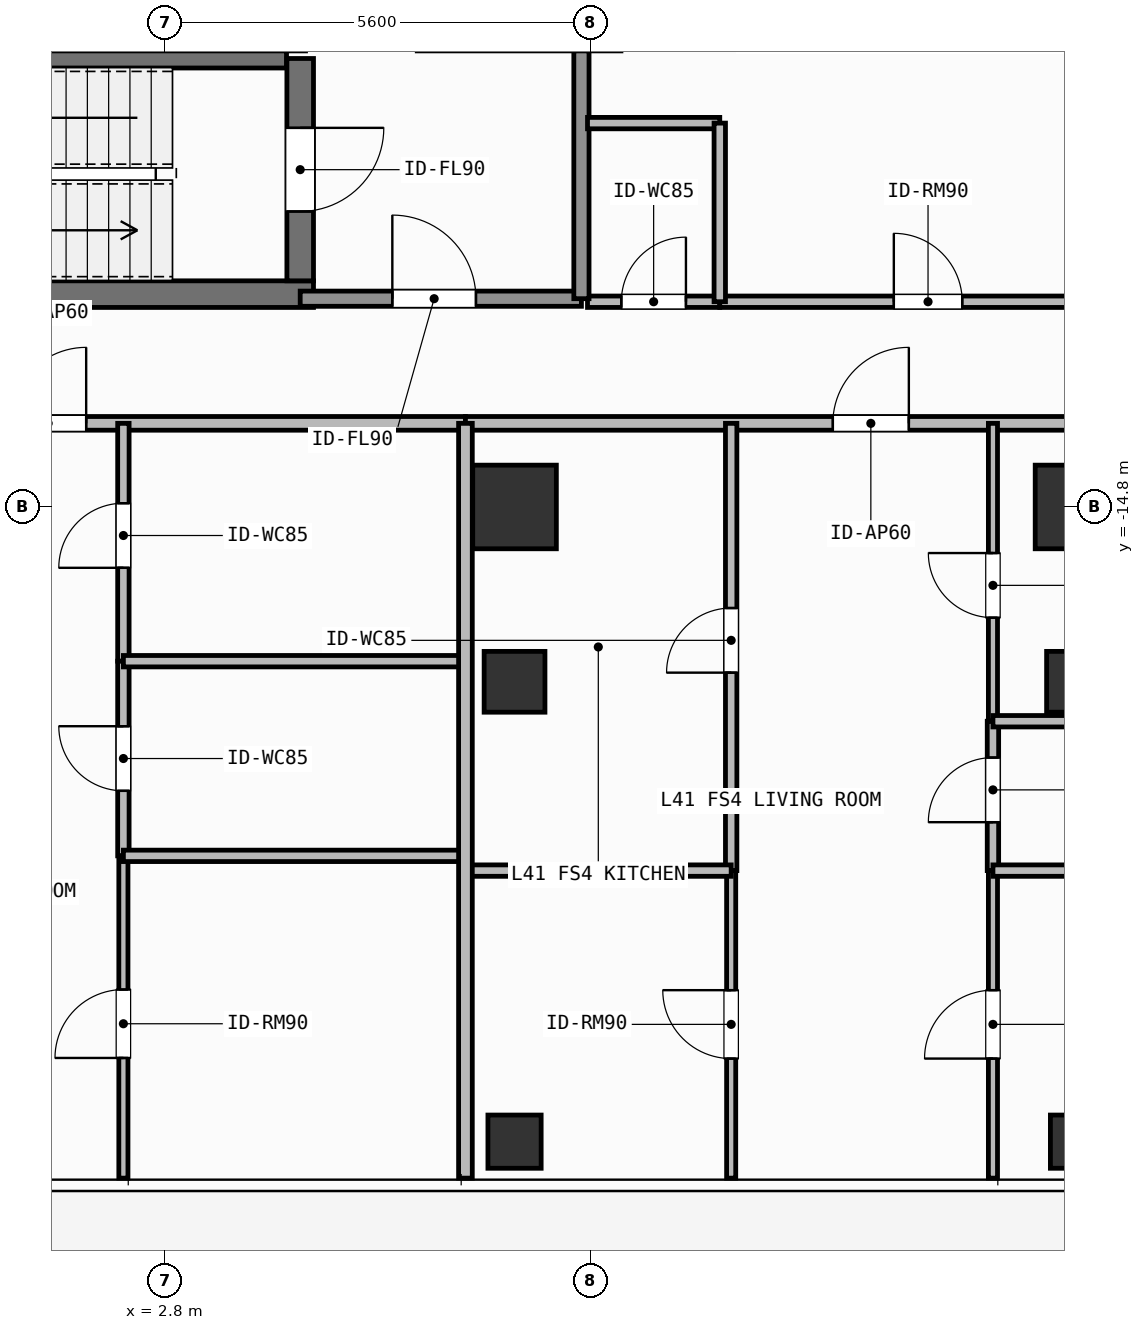
"""IFC4 building model, lengths in metres.
Left out: names, types, materials, properties, quantities, classifications, styles, units other than length and angle.
Written with IfcOpenShell. Run it as: python <this file> out.ifc"""

import sys

from ifc_helpers import new_model, si_unit, direction, frame, frame_2d, origin, origin_2d, place, context, subcontext, project, spatial, rectangle, hollow_rectangle, extrude, element, fill, save


model = new_model("IFC4")
c1 = context("Model", 3, precision=1e-05, world=origin(), true_north=direction((0.0, 1.0)))
c2 = subcontext(c1, "Body", "Model", "MODEL_VIEW")
j1 = project(units=[si_unit("LENGTHUNIT", "METRE"), si_unit("PLANEANGLEUNIT", "RADIAN")], contexts=[c1])
p1 = place(None, origin())
s1 = spatial("IfcSite", under=j1, at=p1, CompositionType="ELEMENT")
p2 = place(p1, origin())
s2 = spatial("IfcBuilding", under=s1, at=p2, CompositionType="ELEMENT")
p3 = place(p2, frame((0.0, 0.0, 168.0)))
s3 = spatial("IfcBuildingStorey", under=s2, at=p3, CompositionType="ELEMENT", Elevation=168.0)
p4 = place(p3, frame((-2.555, -12.0, 0.0), z_axis=(0.0, 0.0, 1.0), x_axis=(1.0, 0.0, 0.0)))
e1 = element("IfcWall", 1, at=p4, inside=s3, PredefinedType="SHEAR", context=c2, shape_type="SweptSolid", body=[
    extrude(rectangle(XDim=7.31, YDim=0.35, at=frame_2d((3.655, 0.0))), origin(), (0.0, 0.0, 1.0), 3.9),
])
p5 = place(p3, frame((-2.2, -8.913, 0.0), z_axis=(0.0, 0.0, 1.0), x_axis=(1.0, 0.0, 0.0)))
e2 = element("IfcWall", 2, at=p5, inside=s3, PredefinedType="SHEAR", context=c2, shape_type="SweptSolid", body=[
    extrude(rectangle(XDim=6.6, YDim=0.225, at=frame_2d((3.3, 0.0))), origin(), (0.0, 0.0, 1.0), 3.9),
])
p6 = place(p3, frame((4.58, -8.9, 0.0), z_axis=(0.0, 0.0, 1.0), x_axis=(0.0, -1.0, 0.0)))
e3 = element("IfcWall", 3, at=p6, inside=s3, PredefinedType="SHEAR", context=c2, shape_type="SweptSolid", body=[
    extrude(rectangle(XDim=2.925, YDim=0.35, at=frame_2d((1.462, 0.0))), origin(), (0.0, 0.0, 1.0), 3.9),
])
p7 = place(p6, frame((0.913, 0.0, 0.0)))
e4 = element("IfcOpeningElement", 4, at=p7, cuts=e3, PredefinedType="OPENING", context=c2, shape_type="SweptSolid", body=[
    extrude(rectangle(XDim=1.1, YDim=2.15, at=frame_2d((0.55, 1.075))), frame((0.0, 0.185, 0.0), z_axis=(0.0, -1.0, 0.0), x_axis=(1.0, 0.0, 0.0)), (0.0, 0.0, 1.0), 0.37),
])
for number, where, z_axis, x_axis in (
    (5, (7.4, -14.8, 0.0), (0.0, 0.0, 1.0), (1.0, 0.0, 0.0)),
    (6, (14.8, -14.8, 0.0), (0.0, 0.0, 1.0), (1.0, 0.0, 0.0)),
):
    element("IfcColumn", number, at=place(p3, frame(where, z_axis=z_axis, x_axis=x_axis)), inside=s3, PredefinedType="COLUMN", context=c2, shape_type="SweptSolid", body=[
        extrude(rectangle(XDim=1.1, YDim=1.1, at=origin_2d()), origin(), (0.0, 0.0, 1.0), 3.9),
    ])
for number, where, z_axis, x_axis in (
    (7, (7.4, -17.1, 0.0), (0.0, 0.0, 1.0), (1.0, 0.0, 0.0)),
    (8, (14.8, -17.1, 0.0), (0.0, 0.0, 1.0), (1.0, 0.0, 0.0)),
):
    element("IfcColumn", number, at=place(p3, frame(where, z_axis=z_axis, x_axis=x_axis)), inside=s3, PredefinedType="COLUMN", context=c2, shape_type="SweptSolid", body=[
        extrude(hollow_rectangle(XDim=0.8, YDim=0.8, WallThickness=0.036, at=origin_2d()), origin(), (0.0, 0.0, 1.0), 3.9),
    ])
for number, where, z_axis, x_axis in (
    (9, (7.4, -23.15, 0.0), (0.0, 0.0, 1.0), (1.0, 0.0, 0.0)),
    (10, (14.8, -23.15, 0.0), (0.0, 0.0, 1.0), (1.0, 0.0, 0.0)),
):
    element("IfcColumn", number, at=place(p3, frame(where, z_axis=z_axis, x_axis=x_axis)), inside=s3, PredefinedType="COLUMN", context=c2, shape_type="SweptSolid", body=[
        extrude(hollow_rectangle(XDim=0.7, YDim=0.7, WallThickness=0.032, at=origin_2d()), origin(), (0.0, 0.0, 1.0), 3.9),
    ])
p8 = place(p3, frame((4.58, -12.06, 0.0), z_axis=(0.0, 0.0, 1.0), x_axis=(1.0, 0.0, 0.0)))
e11 = element("IfcWall", 11, at=p8, inside=s3, PredefinedType="SOLIDWALL", context=c2, shape_type="SweptSolid", body=[
    extrude(rectangle(XDim=3.7, YDim=0.2, at=frame_2d((1.85, 0.0))), origin(), (0.0, 0.0, 1.0), 3.68),
])
p9 = place(p8, frame((1.212, 0.0, 0.0)))
e12 = element("IfcOpeningElement", 12, at=p9, cuts=e11, PredefinedType="OPENING", context=c2, shape_type="SweptSolid", body=[
    extrude(rectangle(XDim=1.1, YDim=2.15, at=frame_2d((0.55, 1.075))), frame((0.0, 0.11, 0.0), z_axis=(0.0, -1.0, 0.0), x_axis=(1.0, 0.0, 0.0)), (0.0, 0.0, 1.0), 0.22),
])
p10 = place(p3, frame((8.36, -12.1, 0.0), z_axis=(0.0, 0.0, 1.0), x_axis=(1.0, 0.0, 0.0)))
e13 = element("IfcWall", 13, at=p10, inside=s3, PredefinedType="PARTITIONING", context=c2, shape_type="SweptSolid", body=[
    extrude(rectangle(XDim=1.74, YDim=0.15, at=frame_2d((0.87, 0.0))), origin(), (0.0, 0.0, 1.0), 3.68),
])
p11 = place(p10, frame((0.445, 0.0, 0.0)))
e14 = element("IfcOpeningElement", 14, at=p11, cuts=e13, PredefinedType="OPENING", context=c2, shape_type="SweptSolid", body=[
    extrude(rectangle(XDim=0.85, YDim=2.1, at=frame_2d((0.425, 1.05))), frame((0.0, 0.085, 0.0), z_axis=(0.0, -1.0, 0.0), x_axis=(1.0, 0.0, 0.0)), (0.0, 0.0, 1.0), 0.17),
])
p12 = place(p3, frame((10.1, -12.1, 0.0), z_axis=(0.0, 0.0, 1.0), x_axis=(1.0, 0.0, 0.0)))
e15 = element("IfcWall", 15, at=p12, inside=s3, PredefinedType="PARTITIONING", context=c2, shape_type="SweptSolid", body=[
    extrude(rectangle(XDim=5.48, YDim=0.15, at=frame_2d((2.74, 0.0))), origin(), (0.0, 0.0, 1.0), 3.68),
])
p13 = place(p12, frame((2.29, 0.0, 0.0)))
e16 = element("IfcOpeningElement", 16, at=p13, cuts=e15, PredefinedType="OPENING", context=c2, shape_type="SweptSolid", body=[
    extrude(rectangle(XDim=0.9, YDim=2.1, at=frame_2d((0.45, 1.05))), frame((0.0, 0.085, 0.0), z_axis=(0.0, -1.0, 0.0), x_axis=(1.0, 0.0, 0.0)), (0.0, 0.0, 1.0), 0.17),
])
p14 = place(p3, frame((-1.9, -13.7, 0.0), z_axis=(0.0, 0.0, 1.0), x_axis=(1.0, 0.0, 0.0)))
e17 = element("IfcWall", 17, at=p14, inside=s3, PredefinedType="PARTITIONING", context=c2, shape_type="SweptSolid", body=[
    extrude(rectangle(XDim=8.654, YDim=0.18, at=frame_2d((4.327, 0.0))), origin(), (0.0, 0.0, 1.0), 3.68),
])
p15 = place(p14, frame((2.664, 0.0, 0.0)))
e18 = element("IfcOpeningElement", 18, at=p15, cuts=e17, PredefinedType="OPENING", context=c2, shape_type="SweptSolid", body=[
    extrude(rectangle(XDim=1.0, YDim=2.2, at=frame_2d((0.5, 1.1))), frame((0.0, 0.1, 0.0), z_axis=(0.0, -1.0, 0.0), x_axis=(1.0, 0.0, 0.0)), (0.0, 0.0, 1.0), 0.2),
])
p16 = place(p3, frame((2.254, -16.829, 0.0), z_axis=(0.0, 0.0, 1.0), x_axis=(0.0, 1.0, 0.0)))
e19 = element("IfcWall", 19, at=p16, inside=s3, PredefinedType="PARTITIONING", context=c2, shape_type="SweptSolid", body=[
    extrude(rectangle(XDim=3.129, YDim=0.15, at=frame_2d((1.564, 0.0))), origin(), (0.0, 0.0, 1.0), 3.68),
])
p17 = place(p16, frame((1.229, 0.0, 0.0)))
e20 = element("IfcOpeningElement", 20, at=p17, cuts=e19, PredefinedType="OPENING", context=c2, shape_type="SweptSolid", body=[
    extrude(rectangle(XDim=0.85, YDim=2.1, at=frame_2d((0.425, 1.05))), frame((0.0, 0.085, 0.0), z_axis=(0.0, -1.0, 0.0), x_axis=(1.0, 0.0, 0.0)), (0.0, 0.0, 1.0), 0.17),
])
p18 = place(p3, frame((2.254, -19.39, 0.0), z_axis=(0.0, 0.0, 1.0), x_axis=(0.0, 1.0, 0.0)))
e21 = element("IfcWall", 21, at=p18, inside=s3, PredefinedType="PARTITIONING", context=c2, shape_type="SweptSolid", body=[
    extrude(rectangle(XDim=2.561, YDim=0.15, at=frame_2d((1.28, 0.0))), origin(), (0.0, 0.0, 1.0), 3.68),
])
p19 = place(p18, frame((0.855, 0.0, 0.0)))
e22 = element("IfcOpeningElement", 22, at=p19, cuts=e21, PredefinedType="OPENING", context=c2, shape_type="SweptSolid", body=[
    extrude(rectangle(XDim=0.85, YDim=2.1, at=frame_2d((0.425, 1.05))), frame((0.0, 0.085, 0.0), z_axis=(0.0, -1.0, 0.0), x_axis=(1.0, 0.0, 0.0)), (0.0, 0.0, 1.0), 0.17),
])
p20 = place(p3, frame((2.254, -23.63, 0.0), z_axis=(0.0, 0.0, 1.0), x_axis=(0.0, 1.0, 0.0)))
e23 = element("IfcWall", 23, at=p20, inside=s3, PredefinedType="PARTITIONING", context=c2, shape_type="SweptSolid", body=[
    extrude(rectangle(XDim=4.24, YDim=0.12, at=frame_2d((2.12, 0.0))), origin(), (0.0, 0.0, 1.0), 3.68),
])
p21 = place(p20, frame((1.581, 0.0, 0.0)))
e24 = element("IfcOpeningElement", 24, at=p21, cuts=e23, PredefinedType="OPENING", context=c2, shape_type="SweptSolid", body=[
    extrude(rectangle(XDim=0.9, YDim=2.1, at=frame_2d((0.45, 1.05))), frame((0.0, 0.07, 0.0), z_axis=(0.0, -1.0, 0.0), x_axis=(1.0, 0.0, 0.0)), (0.0, 0.0, 1.0), 0.14),
])
p22 = place(p3, frame((6.754, -13.7, 0.0), z_axis=(0.0, 0.0, 1.0), x_axis=(1.0, 0.0, 0.0)))
e25 = element("IfcWall", 25, at=p22, inside=s3, PredefinedType="PARTITIONING", context=c2, shape_type="SweptSolid", body=[
    extrude(rectangle(XDim=11.566, YDim=0.18, at=frame_2d((5.783, 0.0))), origin(), (0.0, 0.0, 1.0), 3.68),
])
p23 = place(p22, frame((4.833, 0.0, 0.0)))
e26 = element("IfcOpeningElement", 26, at=p23, cuts=e25, PredefinedType="OPENING", context=c2, shape_type="SweptSolid", body=[
    extrude(rectangle(XDim=1.0, YDim=2.2, at=frame_2d((0.5, 1.1))), frame((0.0, 0.1, 0.0), z_axis=(0.0, -1.0, 0.0), x_axis=(1.0, 0.0, 0.0)), (0.0, 0.0, 1.0), 0.2),
])
p24 = place(p3, frame((10.25, -19.584, 0.0), z_axis=(0.0, 0.0, 1.0), x_axis=(0.0, 1.0, 0.0)))
e27 = element("IfcWall", 27, at=p24, inside=s3, PredefinedType="PARTITIONING", context=c2, shape_type="SweptSolid", body=[
    extrude(rectangle(XDim=5.884, YDim=0.15, at=frame_2d((2.942, 0.0))), origin(), (0.0, 0.0, 1.0), 3.68),
])
p25 = place(p24, frame((2.604, 0.0, 0.0)))
e28 = element("IfcOpeningElement", 28, at=p25, cuts=e27, PredefinedType="OPENING", context=c2, shape_type="SweptSolid", body=[
    extrude(rectangle(XDim=0.85, YDim=2.1, at=frame_2d((0.425, 1.05))), frame((0.0, 0.085, 0.0), z_axis=(0.0, -1.0, 0.0), x_axis=(1.0, 0.0, 0.0)), (0.0, 0.0, 1.0), 0.17),
])
p26 = place(p3, frame((10.25, -23.63, 0.0), z_axis=(0.0, 0.0, 1.0), x_axis=(0.0, 1.0, 0.0)))
e29 = element("IfcWall", 29, at=p26, inside=s3, PredefinedType="PARTITIONING", context=c2, shape_type="SweptSolid", body=[
    extrude(rectangle(XDim=4.046, YDim=0.12, at=frame_2d((2.023, 0.0))), origin(), (0.0, 0.0, 1.0), 3.68),
])
p27 = place(p26, frame((1.573, 0.0, 0.0)))
e30 = element("IfcOpeningElement", 30, at=p27, cuts=e29, PredefinedType="OPENING", context=c2, shape_type="SweptSolid", body=[
    extrude(rectangle(XDim=0.9, YDim=2.1, at=frame_2d((0.45, 1.05))), frame((0.0, 0.07, 0.0), z_axis=(0.0, -1.0, 0.0), x_axis=(1.0, 0.0, 0.0)), (0.0, 0.0, 1.0), 0.14),
])
p28 = place(p3, frame((13.694, -19.584, 0.0), z_axis=(0.0, 0.0, 1.0), x_axis=(0.0, 1.0, 0.0)))
e31 = element("IfcWall", 31, at=p28, inside=s3, PredefinedType="PARTITIONING", context=c2, shape_type="SweptSolid", body=[
    extrude(rectangle(XDim=1.965, YDim=0.15, at=frame_2d((0.982, 0.0))), origin(), (0.0, 0.0, 1.0), 3.68),
])
p29 = place(p28, frame((0.637, 0.0, 0.0)))
e32 = element("IfcOpeningElement", 32, at=p29, cuts=e31, PredefinedType="OPENING", context=c2, shape_type="SweptSolid", body=[
    extrude(rectangle(XDim=0.85, YDim=2.1, at=frame_2d((0.425, 1.05))), frame((0.0, 0.085, 0.0), z_axis=(0.0, -1.0, 0.0), x_axis=(1.0, 0.0, 0.0)), (0.0, 0.0, 1.0), 0.17),
])
p30 = place(p3, frame((13.694, -17.619, 0.0), z_axis=(0.0, 0.0, 1.0), x_axis=(0.0, 1.0, 0.0)))
e33 = element("IfcWall", 33, at=p30, inside=s3, PredefinedType="PARTITIONING", context=c2, shape_type="SweptSolid", body=[
    extrude(rectangle(XDim=3.919, YDim=0.12, at=frame_2d((1.959, 0.0))), origin(), (0.0, 0.0, 1.0), 3.68),
])
p31 = place(p30, frame((1.363, 0.0, 0.0)))
e34 = element("IfcOpeningElement", 34, at=p31, cuts=e33, PredefinedType="OPENING", context=c2, shape_type="SweptSolid", body=[
    extrude(rectangle(XDim=0.85, YDim=2.1, at=frame_2d((0.425, 1.05))), frame((0.0, 0.07, 0.0), z_axis=(0.0, -1.0, 0.0), x_axis=(1.0, 0.0, 0.0)), (0.0, 0.0, 1.0), 0.14),
])
p32 = place(p3, frame((13.694, -23.63, 0.0), z_axis=(0.0, 0.0, 1.0), x_axis=(0.0, 1.0, 0.0)))
e35 = element("IfcWall", 35, at=p32, inside=s3, PredefinedType="PARTITIONING", context=c2, shape_type="SweptSolid", body=[
    extrude(rectangle(XDim=4.046, YDim=0.12, at=frame_2d((2.023, 0.0))), origin(), (0.0, 0.0, 1.0), 3.68),
])
p33 = place(p32, frame((1.573, 0.0, 0.0)))
e36 = element("IfcOpeningElement", 36, at=p33, cuts=e35, PredefinedType="OPENING", context=c2, shape_type="SweptSolid", body=[
    extrude(rectangle(XDim=0.9, YDim=2.1, at=frame_2d((0.45, 1.05))), frame((0.0, 0.07, 0.0), z_axis=(0.0, -1.0, 0.0), x_axis=(1.0, 0.0, 0.0)), (0.0, 0.0, 1.0), 0.14),
])
p34 = place(p3, frame((8.28, -12.06, 0.0), z_axis=(0.0, 0.0, 1.0), x_axis=(0.0, 1.0, 0.0)))
e37 = element("IfcWall", 37, at=p34, inside=s3, PredefinedType="SOLIDWALL", context=c2, shape_type="SweptSolid", body=[
    extrude(rectangle(XDim=3.26, YDim=0.2, at=frame_2d((1.63, 0.0))), origin(), (0.0, 0.0, 1.0), 3.68),
])
p35 = place(p3, frame((8.36, -9.75, 0.0), z_axis=(0.0, 0.0, 1.0), x_axis=(1.0, 0.0, 0.0)))
e38 = element("IfcWall", 38, at=p35, inside=s3, PredefinedType="PARTITIONING", context=c2, shape_type="SweptSolid", body=[
    extrude(rectangle(XDim=1.74, YDim=0.15, at=frame_2d((0.87, 0.0))), origin(), (0.0, 0.0, 1.0), 3.68),
])
p36 = place(p3, frame((10.1, -12.1, 0.0), z_axis=(0.0, 0.0, 1.0), x_axis=(0.0, 1.0, 0.0)))
e39 = element("IfcWall", 39, at=p36, inside=s3, PredefinedType="PARTITIONING", context=c2, shape_type="SweptSolid", body=[
    extrude(rectangle(XDim=2.35, YDim=0.15, at=frame_2d((1.175, 0.0))), origin(), (0.0, 0.0, 1.0), 3.68),
])
p37 = place(p3, frame((2.254, -16.829, 0.0), z_axis=(0.0, 0.0, 1.0), x_axis=(1.0, 0.0, 0.0)))
e40 = element("IfcWall", 40, at=p37, inside=s3, PredefinedType="PARTITIONING", context=c2, shape_type="SweptSolid", body=[
    extrude(rectangle(XDim=4.5, YDim=0.15, at=frame_2d((2.25, 0.0))), origin(), (0.0, 0.0, 1.0), 3.082),
])
p38 = place(p3, frame((2.254, -19.39, 0.0), z_axis=(0.0, 0.0, 1.0), x_axis=(1.0, 0.0, 0.0)))
e41 = element("IfcWall", 41, at=p38, inside=s3, PredefinedType="PARTITIONING", context=c2, shape_type="SweptSolid", body=[
    extrude(rectangle(XDim=4.5, YDim=0.15, at=frame_2d((2.25, 0.0))), origin(), (0.0, 0.0, 1.0), 3.68),
])
p39 = place(p3, frame((6.754, -19.584, 0.0), z_axis=(0.0, 0.0, 1.0), x_axis=(1.0, 0.0, 0.0)))
e42 = element("IfcWall", 42, at=p39, inside=s3, PredefinedType="PARTITIONING", context=c2, shape_type="SweptSolid", body=[
    extrude(rectangle(XDim=3.496, YDim=0.15, at=frame_2d((1.748, 0.0))), origin(), (0.0, 0.0, 1.0), 3.68),
])
for number, where, z_axis, x_axis in (
    (43, (13.694, -17.619, 0.0), (0.0, 0.0, 1.0), (1.0, 0.0, 0.0)),
    (44, (13.694, -19.584, 0.0), (0.0, 0.0, 1.0), (1.0, 0.0, 0.0)),
):
    element("IfcWall", number, at=place(p3, frame(where, z_axis=z_axis, x_axis=x_axis)), inside=s3, PredefinedType="PARTITIONING", context=c2, shape_type="SweptSolid", body=[
        extrude(rectangle(XDim=4.626, YDim=0.15, at=frame_2d((2.313, 0.0))), origin(), (0.0, 0.0, 1.0), 3.68),
    ])
p40 = place(p3, frame((6.754, -23.63, 0.0), z_axis=(0.0, 0.0, 1.0), x_axis=(0.0, 1.0, 0.0)))
e45 = element("IfcWall", 45, at=p40, inside=s3, PredefinedType="PARTITIONING", context=c2, shape_type="SweptSolid", body=[
    extrude(rectangle(XDim=9.93, YDim=0.18, at=frame_2d((4.965, 0.0))), origin(), (0.0, 0.0, 1.0), 3.68),
])
p41 = place(p7, origin())
e46 = element("IfcDoor", 46, at=p41, inside=s3, OperationType="SINGLE_SWING_LEFT", PredefinedType="DOOR", context=c2, shape_type="SweptSolid", body=[
    extrude(rectangle(XDim=1.1, YDim=2.15, at=frame_2d((0.55, 1.075))), frame((0.0, 0.025, 0.0), z_axis=(0.0, -1.0, 0.0), x_axis=(1.0, 0.0, 0.0)), (0.0, 0.0, 1.0), 0.05),
])
fill(e4, e46)
p42 = place(p9, origin())
e47 = element("IfcDoor", 47, at=p42, inside=s3, OperationType="SINGLE_SWING_LEFT", PredefinedType="DOOR", context=c2, shape_type="SweptSolid", body=[
    extrude(rectangle(XDim=1.1, YDim=2.15, at=frame_2d((0.55, 1.075))), frame((0.0, 0.025, 0.0), z_axis=(0.0, -1.0, 0.0), x_axis=(1.0, 0.0, 0.0)), (0.0, 0.0, 1.0), 0.05),
])
fill(e12, e47)
p43 = place(p11, origin())
e48 = element("IfcDoor", 48, at=p43, inside=s3, OperationType="SINGLE_SWING_RIGHT", PredefinedType="DOOR", context=c2, shape_type="SweptSolid", body=[
    extrude(rectangle(XDim=0.85, YDim=2.1, at=frame_2d((0.425, 1.05))), frame((0.0, 0.025, 0.0), z_axis=(0.0, -1.0, 0.0), x_axis=(1.0, 0.0, 0.0)), (0.0, 0.0, 1.0), 0.05),
])
fill(e14, e48)
p44 = place(p13, origin())
e49 = element("IfcDoor", 49, at=p44, inside=s3, OperationType="SINGLE_SWING_LEFT", PredefinedType="DOOR", context=c2, shape_type="SweptSolid", body=[
    extrude(rectangle(XDim=0.9, YDim=2.1, at=frame_2d((0.45, 1.05))), frame((0.0, 0.025, 0.0), z_axis=(0.0, -1.0, 0.0), x_axis=(1.0, 0.0, 0.0)), (0.0, 0.0, 1.0), 0.05),
])
fill(e16, e49)
p45 = place(p15, origin())
e50 = element("IfcDoor", 50, at=p45, inside=s3, OperationType="SINGLE_SWING_RIGHT", PredefinedType="DOOR", context=c2, shape_type="SweptSolid", body=[
    extrude(rectangle(XDim=1.0, YDim=2.2, at=frame_2d((0.5, 1.1))), frame((0.0, 0.025, 0.0), z_axis=(0.0, -1.0, 0.0), x_axis=(1.0, 0.0, 0.0)), (0.0, 0.0, 1.0), 0.05),
])
fill(e18, e50)
p46 = place(p17, origin())
e51 = element("IfcDoor", 51, at=p46, inside=s3, OperationType="SINGLE_SWING_LEFT", PredefinedType="DOOR", context=c2, shape_type="SweptSolid", body=[
    extrude(rectangle(XDim=0.85, YDim=2.1, at=frame_2d((0.425, 1.05))), frame((0.0, 0.025, 0.0), z_axis=(0.0, -1.0, 0.0), x_axis=(1.0, 0.0, 0.0)), (0.0, 0.0, 1.0), 0.05),
])
fill(e20, e51)
p47 = place(p19, origin())
e52 = element("IfcDoor", 52, at=p47, inside=s3, OperationType="SINGLE_SWING_RIGHT", PredefinedType="DOOR", context=c2, shape_type="SweptSolid", body=[
    extrude(rectangle(XDim=0.85, YDim=2.1, at=frame_2d((0.425, 1.05))), frame((0.0, 0.025, 0.0), z_axis=(0.0, -1.0, 0.0), x_axis=(1.0, 0.0, 0.0)), (0.0, 0.0, 1.0), 0.05),
])
fill(e22, e52)
p48 = place(p21, origin())
e53 = element("IfcDoor", 53, at=p48, inside=s3, OperationType="SINGLE_SWING_LEFT", PredefinedType="DOOR", context=c2, shape_type="SweptSolid", body=[
    extrude(rectangle(XDim=0.9, YDim=2.1, at=frame_2d((0.45, 1.05))), frame((0.0, 0.025, 0.0), z_axis=(0.0, -1.0, 0.0), x_axis=(1.0, 0.0, 0.0)), (0.0, 0.0, 1.0), 0.05),
])
fill(e24, e53)
p49 = place(p23, origin())
e54 = element("IfcDoor", 54, at=p49, inside=s3, OperationType="SINGLE_SWING_RIGHT", PredefinedType="DOOR", context=c2, shape_type="SweptSolid", body=[
    extrude(rectangle(XDim=1.0, YDim=2.2, at=frame_2d((0.5, 1.1))), frame((0.0, 0.025, 0.0), z_axis=(0.0, -1.0, 0.0), x_axis=(1.0, 0.0, 0.0)), (0.0, 0.0, 1.0), 0.05),
])
fill(e26, e54)
p50 = place(p25, origin())
e55 = element("IfcDoor", 55, at=p50, inside=s3, OperationType="SINGLE_SWING_LEFT", PredefinedType="DOOR", context=c2, shape_type="SweptSolid", body=[
    extrude(rectangle(XDim=0.85, YDim=2.1, at=frame_2d((0.425, 1.05))), frame((0.0, 0.025, 0.0), z_axis=(0.0, -1.0, 0.0), x_axis=(1.0, 0.0, 0.0)), (0.0, 0.0, 1.0), 0.05),
])
fill(e28, e55)
p51 = place(p27, origin())
e56 = element("IfcDoor", 56, at=p51, inside=s3, OperationType="SINGLE_SWING_RIGHT", PredefinedType="DOOR", context=c2, shape_type="SweptSolid", body=[
    extrude(rectangle(XDim=0.9, YDim=2.1, at=frame_2d((0.45, 1.05))), frame((0.0, 0.025, 0.0), z_axis=(0.0, -1.0, 0.0), x_axis=(1.0, 0.0, 0.0)), (0.0, 0.0, 1.0), 0.05),
])
fill(e30, e56)
p52 = place(p29, origin())
e57 = element("IfcDoor", 57, at=p52, inside=s3, OperationType="SINGLE_SWING_LEFT", PredefinedType="DOOR", context=c2, shape_type="SweptSolid", body=[
    extrude(rectangle(XDim=0.85, YDim=2.1, at=frame_2d((0.425, 1.05))), frame((0.0, 0.025, 0.0), z_axis=(0.0, -1.0, 0.0), x_axis=(1.0, 0.0, 0.0)), (0.0, 0.0, 1.0), 0.05),
])
fill(e32, e57)
p53 = place(p31, origin())
e58 = element("IfcDoor", 58, at=p53, inside=s3, OperationType="SINGLE_SWING_RIGHT", PredefinedType="DOOR", context=c2, shape_type="SweptSolid", body=[
    extrude(rectangle(XDim=0.85, YDim=2.1, at=frame_2d((0.425, 1.05))), frame((0.0, 0.025, 0.0), z_axis=(0.0, -1.0, 0.0), x_axis=(1.0, 0.0, 0.0)), (0.0, 0.0, 1.0), 0.05),
])
fill(e34, e58)
p54 = place(p33, origin())
e59 = element("IfcDoor", 59, at=p54, inside=s3, OperationType="SINGLE_SWING_LEFT", PredefinedType="DOOR", context=c2, shape_type="SweptSolid", body=[
    extrude(rectangle(XDim=0.9, YDim=2.1, at=frame_2d((0.45, 1.05))), frame((0.0, 0.025, 0.0), z_axis=(0.0, -1.0, 0.0), x_axis=(1.0, 0.0, 0.0)), (0.0, 0.0, 1.0), 0.05),
])
fill(e36, e59)
save(model, sys.argv[1])
